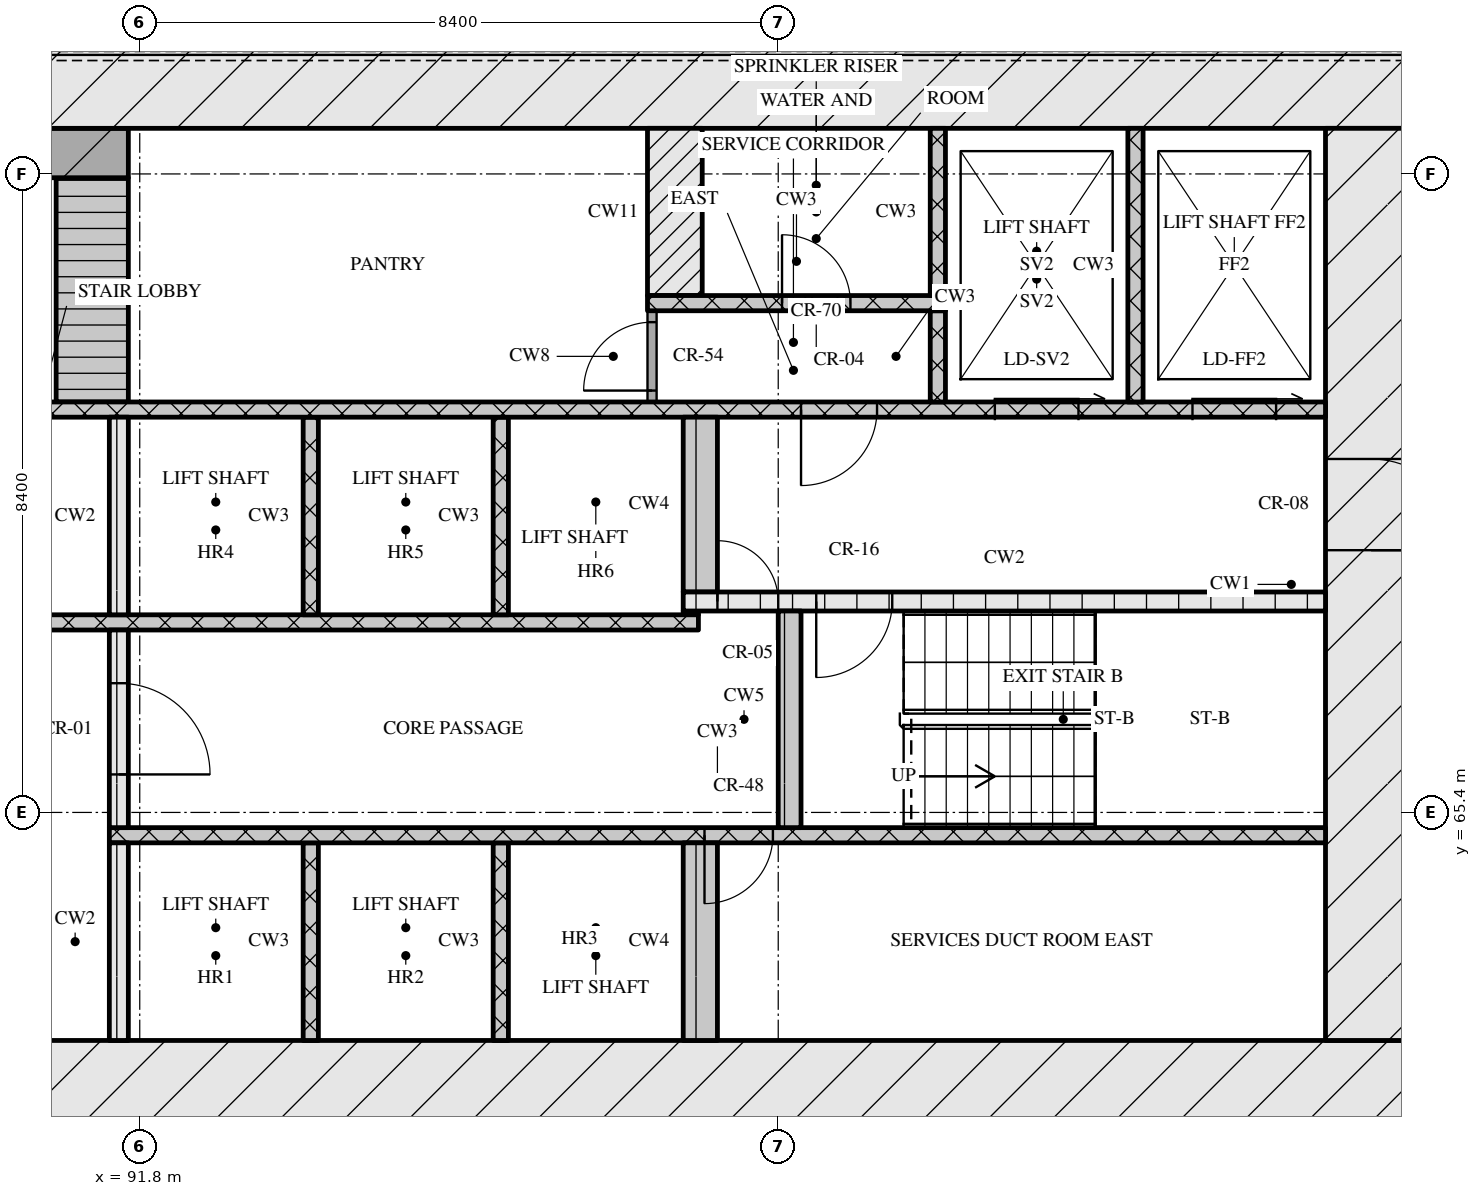
"""IFC4 building model, lengths in metres.
Left out: names, types, materials, properties, quantities, classifications, styles, units other than length and angle.
Written with IfcOpenShell. Run it as: python <this file> out.ifc"""

import sys

from ifc_helpers import new_model, si_unit, direction, frame, frame_2d, origin, place, context, subcontext, project, spatial, rectangle, extrude, element, fill, save


model = new_model("IFC4")
c1 = context("Model", 3, precision=1e-05, world=origin(), true_north=direction((0.0, 1.0)))
c2 = subcontext(c1, "Body", "Model", "MODEL_VIEW")
j1 = project(units=[si_unit("LENGTHUNIT", "METRE"), si_unit("PLANEANGLEUNIT", "RADIAN")], contexts=[c1])
p1 = place(None, origin())
s1 = spatial("IfcSite", under=j1, at=p1, CompositionType="ELEMENT")
p2 = place(p1, origin())
s2 = spatial("IfcBuilding", under=s1, at=p2, CompositionType="ELEMENT")
p3 = place(p2, frame((0.0, 0.0, 69.6)))
s3 = spatial("IfcBuildingStorey", under=s2, at=p3, CompositionType="ELEMENT", Elevation=69.6)
p4 = place(p3, frame((66.6, 61.8, 0.0), z_axis=(0.0, 0.0, 1.0), x_axis=(1.0, 0.0, 0.0)))
e1 = element("IfcWall", 1, at=p4, inside=s3, PredefinedType="SOLIDWALL", context=c2, shape_type="SweptSolid", body=[
    extrude(rectangle(XDim=42.0, YDim=1.2, at=frame_2d((21.0, 0.0))), origin(), (0.0, 0.0, 1.0), 3.32),
])
p5 = place(p4, frame((21.35, 0.0, 0.0)))
e2 = element("IfcOpeningElement", 2, at=p5, cuts=e1, PredefinedType="OPENING", context=c2, shape_type="SweptSolid", body=[
    extrude(rectangle(XDim=1.8, YDim=2.1, at=frame_2d((0.9, 1.05))), frame((0.0, 0.61, 0.0), z_axis=(0.0, -1.0, 0.0), x_axis=(1.0, 0.0, 0.0)), (0.0, 0.0, 1.0), 1.22),
])
p6 = place(p3, frame((66.6, 75.0, 0.0), z_axis=(0.0, 0.0, 1.0), x_axis=(1.0, 0.0, 0.0)))
e3 = element("IfcWall", 3, at=p6, inside=s3, PredefinedType="SOLIDWALL", context=c2, shape_type="SweptSolid", body=[
    extrude(rectangle(XDim=42.0, YDim=1.2, at=frame_2d((21.0, 0.0))), origin(), (0.0, 0.0, 1.0), 3.32),
])
p7 = place(p3, frame((108.0, 62.4, 0.0), z_axis=(0.0, 0.0, 1.0), x_axis=(0.0, 1.0, 0.0)))
e4 = element("IfcWall", 4, at=p7, inside=s3, PredefinedType="SOLIDWALL", context=c2, shape_type="SweptSolid", body=[
    extrude(rectangle(XDim=12.0, YDim=1.2, at=frame_2d((6.0, 0.0))), origin(), (0.0, 0.0, 1.0), 3.32),
])
p8 = place(p7, frame((6.45, 0.0, 0.0)))
e5 = element("IfcOpeningElement", 5, at=p8, cuts=e4, PredefinedType="OPENING", context=c2, shape_type="SweptSolid", body=[
    extrude(rectangle(XDim=1.2, YDim=2.1, at=frame_2d((0.6, 1.05))), frame((0.0, 0.61, 0.0), z_axis=(0.0, -1.0, 0.0), x_axis=(1.0, 0.0, 0.0)), (0.0, 0.0, 1.0), 1.22),
])
p9 = place(p3, frame((91.525, 62.4, 0.0), z_axis=(0.0, 0.0, 1.0), x_axis=(0.0, 1.0, 0.0)))
e6 = element("IfcWall", 6, at=p9, inside=s3, PredefinedType="SOLIDWALL", context=c2, shape_type="SweptSolid", body=[
    extrude(rectangle(XDim=2.6, YDim=0.25, at=frame_2d((1.3, 0.0))), origin(), (0.0, 0.0, 1.0), 3.32),
])
for number, where, z_axis, x_axis in (
    (7, (94.05, 62.4, 0.0), (0.0, 0.0, 1.0), (0.0, 1.0, 0.0)),
    (8, (96.55, 62.4, 0.0), (0.0, 0.0, 1.0), (0.0, 1.0, 0.0)),
):
    element("IfcWall", number, at=place(p3, frame(where, z_axis=z_axis, x_axis=x_axis)), inside=s3, PredefinedType="SOLIDWALL", context=c2, shape_type="SweptSolid", body=[
        extrude(rectangle(XDim=2.6, YDim=0.2, at=frame_2d((1.3, 0.0))), origin(), (0.0, 0.0, 1.0), 3.32),
    ])
p10 = place(p3, frame((99.175, 62.4, 0.0), z_axis=(0.0, 0.0, 1.0), x_axis=(0.0, 1.0, 0.0)))
e9 = element("IfcWall", 9, at=p10, inside=s3, PredefinedType="SOLIDWALL", context=c2, shape_type="SweptSolid", body=[
    extrude(rectangle(XDim=2.6, YDim=0.45, at=frame_2d((1.3, 0.0))), origin(), (0.0, 0.0, 1.0), 3.32),
])
p11 = place(p3, frame((91.4, 65.1, 0.0), z_axis=(0.0, 0.0, 1.0), x_axis=(1.0, 0.0, 0.0)))
e10 = element("IfcWall", 10, at=p11, inside=s3, PredefinedType="SOLIDWALL", context=c2, shape_type="SweptSolid", body=[
    extrude(rectangle(XDim=16.0, YDim=0.2, at=frame_2d((8.0, 0.0))), origin(), (0.0, 0.0, 1.0), 3.32),
])
p12 = place(p11, frame((7.83, 0.0, 0.0)))
e11 = element("IfcOpeningElement", 11, at=p12, cuts=e10, PredefinedType="OPENING", context=c2, shape_type="SweptSolid", body=[
    extrude(rectangle(XDim=0.9, YDim=2.1, at=frame_2d((0.45, 1.05))), frame((0.0, 0.11, 0.0), z_axis=(0.0, -1.0, 0.0), x_axis=(1.0, 0.0, 0.0)), (0.0, 0.0, 1.0), 0.22),
])
p13 = place(p3, frame((91.525, 65.2, 0.0), z_axis=(0.0, 0.0, 1.0), x_axis=(0.0, 1.0, 0.0)))
e12 = element("IfcWall", 12, at=p13, inside=s3, PredefinedType="SOLIDWALL", context=c2, shape_type="SweptSolid", body=[
    extrude(rectangle(XDim=2.6, YDim=0.25, at=frame_2d((1.3, 0.0))), origin(), (0.0, 0.0, 1.0), 3.32),
])
p14 = place(p13, frame((0.7, 0.0, 0.0)))
e13 = element("IfcOpeningElement", 13, at=p14, cuts=e12, PredefinedType="OPENING", context=c2, shape_type="SweptSolid", body=[
    extrude(rectangle(XDim=1.2, YDim=2.1, at=frame_2d((0.6, 1.05))), frame((0.0, 0.135, 0.0), z_axis=(0.0, -1.0, 0.0), x_axis=(1.0, 0.0, 0.0)), (0.0, 0.0, 1.0), 0.27),
])
p15 = place(p3, frame((100.35, 65.2, 0.0), z_axis=(0.0, 0.0, 1.0), x_axis=(0.0, 1.0, 0.0)))
e14 = element("IfcWall", 14, at=p15, inside=s3, PredefinedType="SOLIDWALL", context=c2, shape_type="SweptSolid", body=[
    extrude(rectangle(XDim=2.85, YDim=0.3, at=frame_2d((1.425, 0.0))), origin(), (0.0, 0.0, 1.0), 3.32),
])
p16 = place(p3, frame((76.05, 67.9, 0.0), z_axis=(0.0, 0.0, 1.0), x_axis=(1.0, 0.0, 0.0)))
e15 = element("IfcWall", 15, at=p16, inside=s3, PredefinedType="SOLIDWALL", context=c2, shape_type="SweptSolid", body=[
    extrude(rectangle(XDim=23.1, YDim=0.2, at=frame_2d((11.55, 0.0))), origin(), (0.0, 0.0, 1.0), 3.32),
])
p17 = place(p16, frame((0.6, 0.0, 0.0)))
e16 = element("IfcOpeningElement", 16, at=p17, cuts=e15, PredefinedType="OPENING", context=c2, shape_type="SweptSolid", body=[
    extrude(rectangle(XDim=1.1, YDim=2.1, at=frame_2d((0.55, 1.05))), frame((0.0, 0.11, 0.0), z_axis=(0.0, -1.0, 0.0), x_axis=(1.0, 0.0, 0.0)), (0.0, 0.0, 1.0), 0.22),
])
p18 = place(p16, frame((3.1, 0.0, 0.0)))
e17 = element("IfcOpeningElement", 17, at=p18, cuts=e15, PredefinedType="OPENING", context=c2, shape_type="SweptSolid", body=[
    extrude(rectangle(XDim=1.1, YDim=2.1, at=frame_2d((0.55, 1.05))), frame((0.0, 0.11, 0.0), z_axis=(0.0, -1.0, 0.0), x_axis=(1.0, 0.0, 0.0)), (0.0, 0.0, 1.0), 0.22),
])
p19 = place(p16, frame((5.6, 0.0, 0.0)))
e18 = element("IfcOpeningElement", 18, at=p19, cuts=e15, PredefinedType="OPENING", context=c2, shape_type="SweptSolid", body=[
    extrude(rectangle(XDim=1.1, YDim=2.1, at=frame_2d((0.55, 1.05))), frame((0.0, 0.11, 0.0), z_axis=(0.0, -1.0, 0.0), x_axis=(1.0, 0.0, 0.0)), (0.0, 0.0, 1.0), 0.22),
])
p20 = place(p16, frame((8.45, 0.0, 0.0)))
e19 = element("IfcOpeningElement", 19, at=p20, cuts=e15, PredefinedType="OPENING", context=c2, shape_type="SweptSolid", body=[
    extrude(rectangle(XDim=0.9, YDim=2.1, at=frame_2d((0.45, 1.05))), frame((0.0, 0.11, 0.0), z_axis=(0.0, -1.0, 0.0), x_axis=(1.0, 0.0, 0.0)), (0.0, 0.0, 1.0), 0.22),
])
p21 = place(p16, frame((10.91, 0.0, 0.0)))
e20 = element("IfcOpeningElement", 20, at=p21, cuts=e15, PredefinedType="OPENING", context=c2, shape_type="SweptSolid", body=[
    extrude(rectangle(XDim=0.9, YDim=2.1, at=frame_2d((0.45, 1.05))), frame((0.0, 0.11, 0.0), z_axis=(0.0, -1.0, 0.0), x_axis=(1.0, 0.0, 0.0)), (0.0, 0.0, 1.0), 0.22),
])
p22 = place(p16, frame((13.55, 0.0, 0.0)))
e21 = element("IfcOpeningElement", 21, at=p22, cuts=e15, PredefinedType="OPENING", context=c2, shape_type="SweptSolid", body=[
    extrude(rectangle(XDim=1.0, YDim=2.1, at=frame_2d((0.5, 1.05))), frame((0.0, 0.11, 0.0), z_axis=(0.0, -1.0, 0.0), x_axis=(1.0, 0.0, 0.0)), (0.0, 0.0, 1.0), 0.22),
])
p23 = place(p3, frame((91.525, 68.0, 0.0), z_axis=(0.0, 0.0, 1.0), x_axis=(0.0, 1.0, 0.0)))
e22 = element("IfcWall", 22, at=p23, inside=s3, PredefinedType="SOLIDWALL", context=c2, shape_type="SweptSolid", body=[
    extrude(rectangle(XDim=2.6, YDim=0.25, at=frame_2d((1.3, 0.0))), origin(), (0.0, 0.0, 1.0), 3.32),
])
for number, where, z_axis, x_axis in (
    (23, (94.05, 68.0, 0.0), (0.0, 0.0, 1.0), (0.0, 1.0, 0.0)),
    (24, (96.55, 68.0, 0.0), (0.0, 0.0, 1.0), (0.0, 1.0, 0.0)),
):
    element("IfcWall", number, at=place(p3, frame(where, z_axis=z_axis, x_axis=x_axis)), inside=s3, PredefinedType="SOLIDWALL", context=c2, shape_type="SweptSolid", body=[
        extrude(rectangle(XDim=2.6, YDim=0.2, at=frame_2d((1.3, 0.0))), origin(), (0.0, 0.0, 1.0), 3.32),
    ])
p24 = place(p3, frame((98.95, 68.025, 0.0), z_axis=(0.0, 0.0, 1.0), x_axis=(1.0, 0.0, 0.0)))
e25 = element("IfcWall", 25, at=p24, inside=s3, PredefinedType="SOLIDWALL", context=c2, shape_type="SweptSolid", body=[
    extrude(rectangle(XDim=0.2, YDim=0.05, at=frame_2d((0.1, 0.0))), origin(), (0.0, 0.0, 1.0), 3.32),
])
p25 = place(p3, frame((98.95, 68.175, 0.0), z_axis=(0.0, 0.0, 1.0), x_axis=(1.0, 0.0, 0.0)))
e26 = element("IfcWall", 26, at=p25, inside=s3, PredefinedType="SOLIDWALL", context=c2, shape_type="SweptSolid", body=[
    extrude(rectangle(XDim=8.45, YDim=0.25, at=frame_2d((4.225, 0.0))), origin(), (0.0, 0.0, 1.0), 3.32),
])
p26 = place(p25, frame((0.45, 0.0, 0.0)))
e27 = element("IfcOpeningElement", 27, at=p26, cuts=e26, PredefinedType="OPENING", context=c2, shape_type="SweptSolid", body=[
    extrude(rectangle(XDim=0.8, YDim=2.1, at=frame_2d((0.4, 1.05))), frame((0.0, 0.135, 0.0), z_axis=(0.0, -1.0, 0.0), x_axis=(1.0, 0.0, 0.0)), (0.0, 0.0, 1.0), 0.27),
])
p27 = place(p25, frame((1.75, 0.0, 0.0)))
e28 = element("IfcOpeningElement", 28, at=p27, cuts=e26, PredefinedType="OPENING", context=c2, shape_type="SweptSolid", body=[
    extrude(rectangle(XDim=1.0, YDim=2.1, at=frame_2d((0.5, 1.05))), frame((0.0, 0.135, 0.0), z_axis=(0.0, -1.0, 0.0), x_axis=(1.0, 0.0, 0.0)), (0.0, 0.0, 1.0), 0.27),
])
p28 = place(p3, frame((99.175, 68.3, 0.0), z_axis=(0.0, 0.0, 1.0), x_axis=(0.0, 1.0, 0.0)))
e29 = element("IfcWall", 29, at=p28, inside=s3, PredefinedType="SOLIDWALL", context=c2, shape_type="SweptSolid", body=[
    extrude(rectangle(XDim=2.3, YDim=0.45, at=frame_2d((1.15, 0.0))), origin(), (0.0, 0.0, 1.0), 3.32),
])
p29 = place(p3, frame((67.8, 70.7, 0.0), z_axis=(0.0, 0.0, 1.0), x_axis=(1.0, 0.0, 0.0)))
e30 = element("IfcWall", 30, at=p29, inside=s3, PredefinedType="SOLIDWALL", context=c2, shape_type="SweptSolid", body=[
    extrude(rectangle(XDim=39.6, YDim=0.2, at=frame_2d((19.8, 0.0))), origin(), (0.0, 0.0, 1.0), 3.32),
])
p30 = place(p29, frame((0.65, 0.0, 0.0)))
e31 = element("IfcOpeningElement", 31, at=p30, cuts=e30, PredefinedType="OPENING", context=c2, shape_type="SweptSolid", body=[
    extrude(rectangle(XDim=1.1, YDim=2.1, at=frame_2d((0.55, 1.05))), frame((0.0, 0.11, 0.0), z_axis=(0.0, -1.0, 0.0), x_axis=(1.0, 0.0, 0.0)), (0.0, 0.0, 1.0), 0.22),
])
p31 = place(p29, frame((3.25, 0.0, 0.0)))
e32 = element("IfcOpeningElement", 32, at=p31, cuts=e30, PredefinedType="OPENING", context=c2, shape_type="SweptSolid", body=[
    extrude(rectangle(XDim=1.1, YDim=2.1, at=frame_2d((0.55, 1.05))), frame((0.0, 0.11, 0.0), z_axis=(0.0, -1.0, 0.0), x_axis=(1.0, 0.0, 0.0)), (0.0, 0.0, 1.0), 0.22),
])
p32 = place(p29, frame((5.9, 0.0, 0.0)))
e33 = element("IfcOpeningElement", 33, at=p32, cuts=e30, PredefinedType="OPENING", context=c2, shape_type="SweptSolid", body=[
    extrude(rectangle(XDim=1.0, YDim=2.1, at=frame_2d((0.5, 1.05))), frame((0.0, 0.11, 0.0), z_axis=(0.0, -1.0, 0.0), x_axis=(1.0, 0.0, 0.0)), (0.0, 0.0, 1.0), 0.22),
])
p33 = place(p29, frame((21.7, 0.0, 0.0)))
e34 = element("IfcOpeningElement", 34, at=p33, cuts=e30, PredefinedType="OPENING", context=c2, shape_type="SweptSolid", body=[
    extrude(rectangle(XDim=1.0, YDim=2.1, at=frame_2d((0.5, 1.05))), frame((0.0, 0.11, 0.0), z_axis=(0.0, -1.0, 0.0), x_axis=(1.0, 0.0, 0.0)), (0.0, 0.0, 1.0), 0.22),
])
p34 = place(p29, frame((32.7, 0.0, 0.0)))
e35 = element("IfcOpeningElement", 35, at=p34, cuts=e30, PredefinedType="OPENING", context=c2, shape_type="SweptSolid", body=[
    extrude(rectangle(XDim=1.0, YDim=2.1, at=frame_2d((0.5, 1.05))), frame((0.0, 0.11, 0.0), z_axis=(0.0, -1.0, 0.0), x_axis=(1.0, 0.0, 0.0)), (0.0, 0.0, 1.0), 0.22),
])
p35 = place(p29, frame((35.25, 0.0, 0.0)))
e36 = element("IfcOpeningElement", 36, at=p35, cuts=e30, PredefinedType="OPENING", context=c2, shape_type="SweptSolid", body=[
    extrude(rectangle(XDim=1.1, YDim=2.1, at=frame_2d((0.55, 1.05))), frame((0.0, 0.11, 0.0), z_axis=(0.0, -1.0, 0.0), x_axis=(1.0, 0.0, 0.0)), (0.0, 0.0, 1.0), 0.22),
])
p36 = place(p29, frame((37.85, 0.0, 0.0)))
e37 = element("IfcOpeningElement", 37, at=p36, cuts=e30, PredefinedType="OPENING", context=c2, shape_type="SweptSolid", body=[
    extrude(rectangle(XDim=1.1, YDim=2.1, at=frame_2d((0.55, 1.05))), frame((0.0, 0.11, 0.0), z_axis=(0.0, -1.0, 0.0), x_axis=(1.0, 0.0, 0.0)), (0.0, 0.0, 1.0), 0.22),
])
p37 = place(p3, frame((91.175, 70.8, 0.0), z_axis=(0.0, 0.0, 1.0), x_axis=(0.0, 1.0, 0.0)))
e38 = element("IfcWall", 38, at=p37, inside=s3, PredefinedType="SOLIDWALL", context=c2, shape_type="SweptSolid", body=[
    extrude(rectangle(XDim=2.95, YDim=0.95, at=frame_2d((1.475, 0.0))), origin(), (0.0, 0.0, 1.0), 3.32),
])
p38 = place(p3, frame((98.54, 70.8, 0.0), z_axis=(0.0, 0.0, 1.0), x_axis=(0.0, 1.0, 0.0)))
e39 = element("IfcWall", 39, at=p38, inside=s3, PredefinedType="PARTITIONING", context=c2, shape_type="SweptSolid", body=[
    extrude(rectangle(XDim=1.2, YDim=0.12, at=frame_2d((0.6, 0.0))), origin(), (0.0, 0.0, 1.0), 3.32),
])
p39 = place(p38, frame((0.15, 0.0, 0.0)))
e40 = element("IfcOpeningElement", 40, at=p39, cuts=e39, PredefinedType="OPENING", context=c2, shape_type="SweptSolid", body=[
    extrude(rectangle(XDim=0.9, YDim=2.1, at=frame_2d((0.45, 1.05))), frame((0.0, 0.07, 0.0), z_axis=(0.0, -1.0, 0.0), x_axis=(1.0, 0.0, 0.0)), (0.0, 0.0, 1.0), 0.14),
])
p40 = place(p3, frame((102.3, 70.8, 0.0), z_axis=(0.0, 0.0, 1.0), x_axis=(0.0, 1.0, 0.0)))
e41 = element("IfcWall", 41, at=p40, inside=s3, PredefinedType="SOLIDWALL", context=c2, shape_type="SweptSolid", body=[
    extrude(rectangle(XDim=1.2, YDim=0.2, at=frame_2d((0.6, 0.0))), origin(), (0.0, 0.0, 1.0), 3.32),
])
p41 = place(p3, frame((104.9, 70.8, 0.0), z_axis=(0.0, 0.0, 1.0), x_axis=(0.0, 1.0, 0.0)))
e42 = element("IfcWall", 42, at=p41, inside=s3, PredefinedType="SOLIDWALL", context=c2, shape_type="SweptSolid", body=[
    extrude(rectangle(XDim=3.6, YDim=0.2, at=frame_2d((1.8, 0.0))), origin(), (0.0, 0.0, 1.0), 3.32),
])
p42 = place(p3, frame((98.48, 72.1, 0.0), z_axis=(0.0, 0.0, 1.0), x_axis=(1.0, 0.0, 0.0)))
e43 = element("IfcWall", 43, at=p42, inside=s3, PredefinedType="SOLIDWALL", context=c2, shape_type="SweptSolid", body=[
    extrude(rectangle(XDim=3.92, YDim=0.2, at=frame_2d((1.96, 0.0))), origin(), (0.0, 0.0, 1.0), 3.32),
])
p43 = place(p42, frame((1.77, 0.0, 0.0)))
e44 = element("IfcOpeningElement", 44, at=p43, cuts=e43, PredefinedType="OPENING", context=c2, shape_type="SweptSolid", body=[
    extrude(rectangle(XDim=0.9, YDim=2.1, at=frame_2d((0.45, 1.05))), frame((0.0, 0.11, 0.0), z_axis=(0.0, -1.0, 0.0), x_axis=(1.0, 0.0, 0.0)), (0.0, 0.0, 1.0), 0.22),
])
p44 = place(p3, frame((98.84, 72.2, 0.0), z_axis=(0.0, 0.0, 1.0), x_axis=(0.0, 1.0, 0.0)))
e45 = element("IfcWall", 45, at=p44, inside=s3, PredefinedType="SOLIDWALL", context=c2, shape_type="SweptSolid", body=[
    extrude(rectangle(XDim=2.2, YDim=0.72, at=frame_2d((1.1, 0.0))), origin(), (0.0, 0.0, 1.0), 3.32),
])
p45 = place(p3, frame((102.3, 72.2, 0.0), z_axis=(0.0, 0.0, 1.0), x_axis=(0.0, 1.0, 0.0)))
e46 = element("IfcWall", 46, at=p45, inside=s3, PredefinedType="SOLIDWALL", context=c2, shape_type="SweptSolid", body=[
    extrude(rectangle(XDim=2.2, YDim=0.2, at=frame_2d((1.1, 0.0))), origin(), (0.0, 0.0, 1.0), 3.32),
])
p46 = place(p3, frame((83.55, 74.075, 0.0), z_axis=(0.0, 0.0, 1.0), x_axis=(1.0, 0.0, 0.0)))
e47 = element("IfcWall", 47, at=p46, inside=s3, PredefinedType="SOLIDWALL", context=c2, shape_type="SweptSolid", body=[
    extrude(rectangle(XDim=8.1, YDim=0.65, at=frame_2d((4.05, 0.0))), origin(), (0.0, 0.0, 1.0), 3.32),
])
p47 = place(p12, origin())
e48 = element("IfcDoor", 48, at=p47, inside=s3, OperationType="SINGLE_SWING_RIGHT", PredefinedType="DOOR", context=c2, shape_type="SweptSolid", body=[
    extrude(rectangle(XDim=0.9, YDim=2.1, at=frame_2d((0.45, 1.05))), frame((0.0, 0.025, 0.0), z_axis=(0.0, -1.0, 0.0), x_axis=(1.0, 0.0, 0.0)), (0.0, 0.0, 1.0), 0.05),
])
fill(e11, e48)
p48 = place(p14, origin())
e49 = element("IfcDoor", 49, at=p48, inside=s3, OperationType="SINGLE_SWING_RIGHT", PredefinedType="DOOR", context=c2, shape_type="SweptSolid", body=[
    extrude(rectangle(XDim=1.2, YDim=2.1, at=frame_2d((0.6, 1.05))), frame((0.0, 0.025, 0.0), z_axis=(0.0, -1.0, 0.0), x_axis=(1.0, 0.0, 0.0)), (0.0, 0.0, 1.0), 0.05),
])
fill(e13, e49)
p49 = place(p26, origin())
e50 = element("IfcDoor", 50, at=p49, inside=s3, OperationType="SINGLE_SWING_LEFT", PredefinedType="DOOR", context=c2, shape_type="SweptSolid", body=[
    extrude(rectangle(XDim=0.8, YDim=2.1, at=frame_2d((0.4, 1.05))), frame((0.0, 0.025, 0.0), z_axis=(0.0, -1.0, 0.0), x_axis=(1.0, 0.0, 0.0)), (0.0, 0.0, 1.0), 0.05),
])
fill(e27, e50)
p50 = place(p27, origin())
e51 = element("IfcDoor", 51, at=p50, inside=s3, OperationType="SINGLE_SWING_RIGHT", PredefinedType="DOOR", context=c2, shape_type="SweptSolid", body=[
    extrude(rectangle(XDim=1.0, YDim=2.1, at=frame_2d((0.5, 1.05))), frame((0.0, 0.025, 0.0), z_axis=(0.0, -1.0, 0.0), x_axis=(1.0, 0.0, 0.0)), (0.0, 0.0, 1.0), 0.05),
])
fill(e28, e51)
p51 = place(p8, origin())
e52 = element("IfcDoor", 52, at=p51, inside=s3, OperationType="SINGLE_SWING_RIGHT", PredefinedType="DOOR", context=c2, shape_type="SweptSolid", body=[
    extrude(rectangle(XDim=1.2, YDim=2.1, at=frame_2d((0.6, 1.05))), frame((0.0, 0.025, 0.0), z_axis=(0.0, -1.0, 0.0), x_axis=(1.0, 0.0, 0.0)), (0.0, 0.0, 1.0), 0.05),
])
fill(e5, e52)
p52 = place(p34, origin())
e53 = element("IfcDoor", 53, at=p52, inside=s3, OperationType="SINGLE_SWING_RIGHT", PredefinedType="DOOR", context=c2, shape_type="SweptSolid", body=[
    extrude(rectangle(XDim=1.0, YDim=2.1, at=frame_2d((0.5, 1.05))), frame((0.0, 0.025, 0.0), z_axis=(0.0, -1.0, 0.0), x_axis=(1.0, 0.0, 0.0)), (0.0, 0.0, 1.0), 0.05),
])
fill(e35, e53)
p53 = place(p35, origin())
e54 = element("IfcDoor", 54, at=p53, inside=s3, OperationType="SLIDING_TO_RIGHT", PredefinedType="DOOR", context=c2, shape_type="SweptSolid", body=[
    extrude(rectangle(XDim=1.1, YDim=2.1, at=frame_2d((0.55, 1.05))), frame((0.0, 0.025, 0.0), z_axis=(0.0, -1.0, 0.0), x_axis=(1.0, 0.0, 0.0)), (0.0, 0.0, 1.0), 0.05),
])
fill(e36, e54)
p54 = place(p36, origin())
e55 = element("IfcDoor", 55, at=p54, inside=s3, OperationType="SLIDING_TO_RIGHT", PredefinedType="DOOR", context=c2, shape_type="SweptSolid", body=[
    extrude(rectangle(XDim=1.1, YDim=2.1, at=frame_2d((0.55, 1.05))), frame((0.0, 0.025, 0.0), z_axis=(0.0, -1.0, 0.0), x_axis=(1.0, 0.0, 0.0)), (0.0, 0.0, 1.0), 0.05),
])
fill(e37, e55)
p55 = place(p39, origin())
e56 = element("IfcDoor", 56, at=p55, inside=s3, OperationType="SINGLE_SWING_LEFT", PredefinedType="DOOR", context=c2, shape_type="SweptSolid", body=[
    extrude(rectangle(XDim=0.9, YDim=2.1, at=frame_2d((0.45, 1.05))), frame((0.0, 0.025, 0.0), z_axis=(0.0, -1.0, 0.0), x_axis=(1.0, 0.0, 0.0)), (0.0, 0.0, 1.0), 0.05),
])
fill(e40, e56)
p56 = place(p43, origin())
e57 = element("IfcDoor", 57, at=p56, inside=s3, OperationType="SINGLE_SWING_LEFT", PredefinedType="DOOR", context=c2, shape_type="SweptSolid", body=[
    extrude(rectangle(XDim=0.9, YDim=2.1, at=frame_2d((0.45, 1.05))), frame((0.0, 0.025, 0.0), z_axis=(0.0, -1.0, 0.0), x_axis=(1.0, 0.0, 0.0)), (0.0, 0.0, 1.0), 0.05),
])
fill(e44, e57)
save(model, sys.argv[1])
